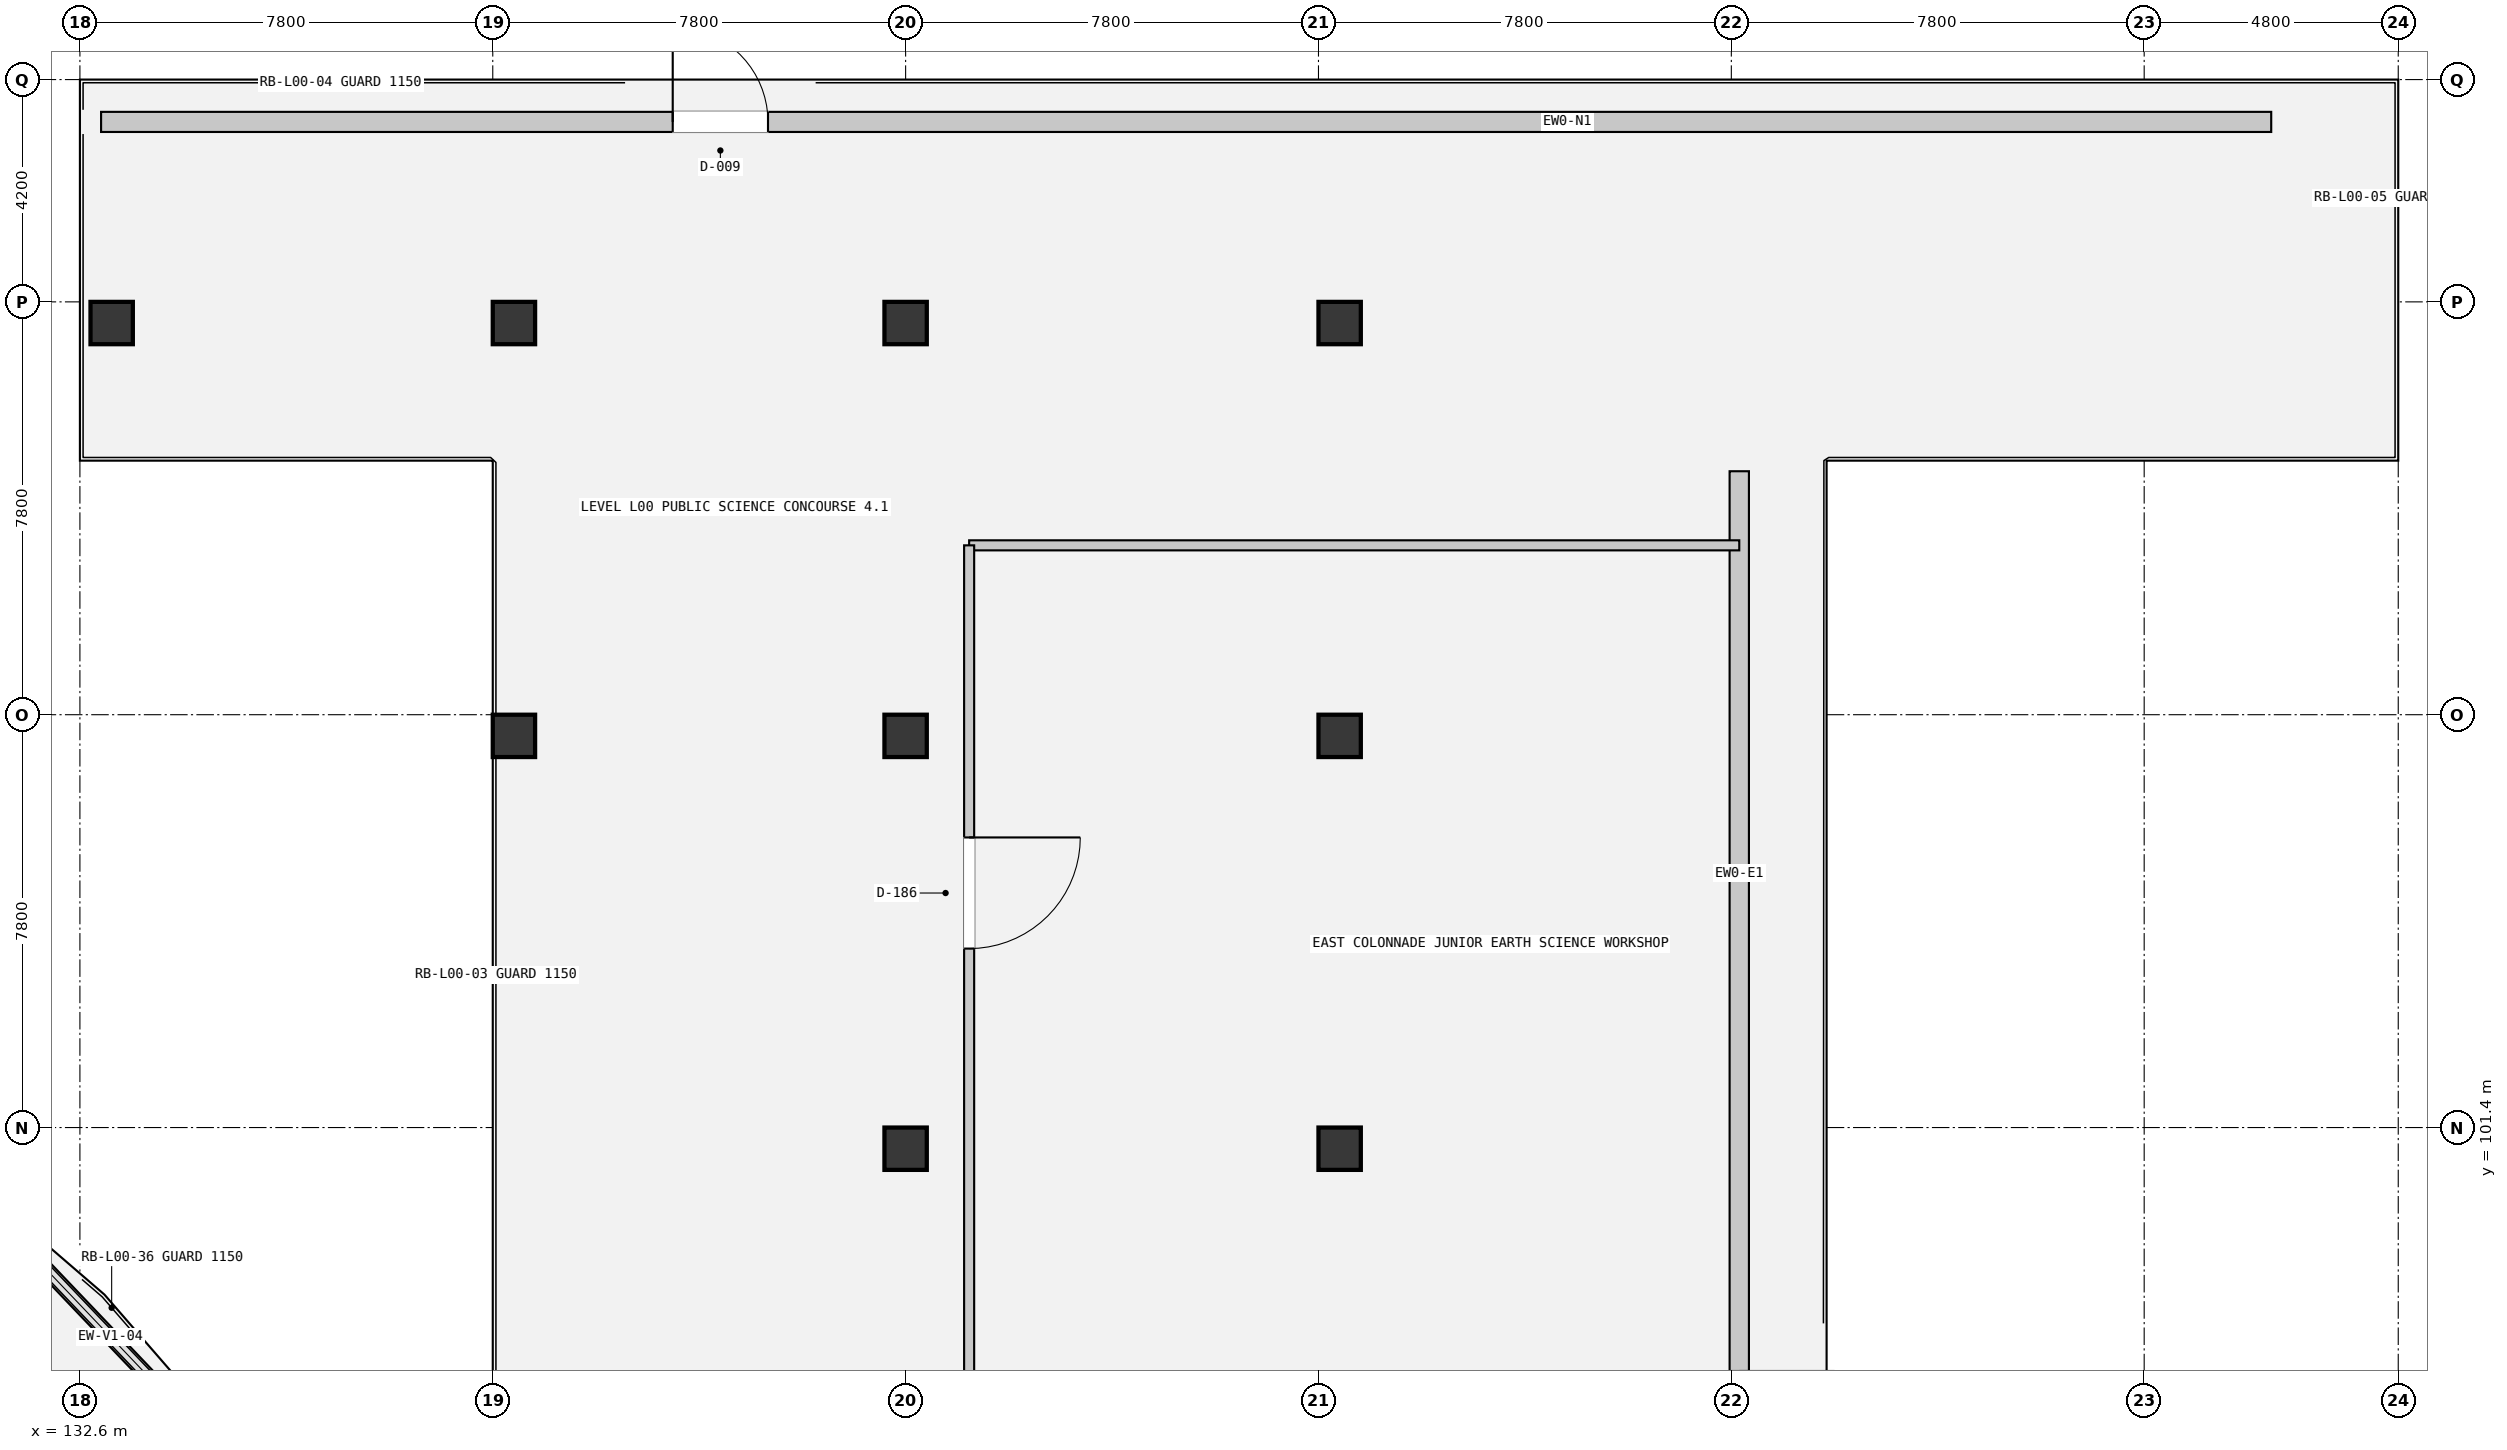
"""IFC4 building model, lengths in metres.
Left out: names, types, materials, properties, quantities, classifications, styles, units other than length and angle.
Written with IfcOpenShell. Run it as: python <this file> out.ifc"""

import sys

from ifc_helpers import new_model, si_unit, direction, frame, frame_2d, origin, origin_2d, place, context, subcontext, project, spatial, rectangle, extrude, element, fill, save


model = new_model("IFC4")
c1 = context("Model", 3, precision=1e-05, world=origin(), true_north=direction((0.0, 1.0)))
c2 = subcontext(c1, "Body", "Model", "MODEL_VIEW")
j1 = project(units=[si_unit("LENGTHUNIT", "METRE"), si_unit("PLANEANGLEUNIT", "RADIAN")], contexts=[c1])
p1 = place(None, origin())
s1 = spatial("IfcSite", under=j1, at=p1, CompositionType="ELEMENT")
p2 = place(p1, origin())
s2 = spatial("IfcBuilding", under=s1, at=p2, CompositionType="ELEMENT")
p3 = place(p2, origin())
s3 = spatial("IfcBuildingStorey", under=s2, at=p3, CompositionType="ELEMENT", Elevation=0.0)
for number, where, z_axis, x_axis in (
    (1, (133.2, 116.6, 0.0), (0.0, 0.0, 1.0), (1.0, 0.0, 0.0)),
    (2, (140.8, 108.8, 0.0), (0.0, 0.0, 1.0), (1.0, 0.0, 0.0)),
    (3, (140.8, 116.6, 0.0), (0.0, 0.0, 1.0), (1.0, 0.0, 0.0)),
    (4, (148.2, 101.0, 0.0), (0.0, 0.0, 1.0), (1.0, 0.0, 0.0)),
    (5, (148.2, 108.8, 0.0), (0.0, 0.0, 1.0), (1.0, 0.0, 0.0)),
    (6, (148.2, 116.6, 0.0), (0.0, 0.0, 1.0), (1.0, 0.0, 0.0)),
    (7, (156.4, 101.0, 0.0), (0.0, 0.0, 1.0), (1.0, 0.0, 0.0)),
    (8, (156.4, 108.8, 0.0), (0.0, 0.0, 1.0), (1.0, 0.0, 0.0)),
    (9, (156.4, 116.6, 0.0), (0.0, 0.0, 1.0), (1.0, 0.0, 0.0)),
):
    element("IfcColumn", number, at=place(p3, frame(where, z_axis=z_axis, x_axis=x_axis)), inside=s3, PredefinedType="COLUMN", context=c2, shape_type="SweptSolid", body=[
        extrude(rectangle(XDim=0.8, YDim=0.8, at=origin_2d()), origin(), (0.0, 0.0, 1.0), 5.4),
    ])
p4 = place(p3, frame((134.923, 95.617, 0.0), z_axis=(0.0, 0.0, 1.0), x_axis=(-0.689954149813, 0.723853072907, 0.0)))
e10 = element("IfcWall", 10, at=p4, inside=s3, PredefinedType="SOLIDWALL", context=c2, shape_type="SweptSolid", body=[
    extrude(rectangle(XDim=5.056, YDim=0.275, at=frame_2d((2.528, 0.0))), origin(), (0.0, 0.0, 1.0), 1.02),
])
p5 = place(p3, frame((133.0, 120.4, 0.0), z_axis=(0.0, 0.0, 1.0), x_axis=(1.0, 0.0, 0.0)))
e11 = element("IfcWall", 11, at=p5, inside=s3, PredefinedType="SOLIDWALL", context=c2, shape_type="SweptSolid", body=[
    extrude(rectangle(XDim=41.0, YDim=0.38, at=frame_2d((20.5, 0.0))), origin(), (0.0, 0.0, 1.0), 4.46),
])
p6 = place(p5, frame((10.8, 0.0, 0.0)))
e12 = element("IfcOpeningElement", 12, at=p6, cuts=e11, PredefinedType="OPENING", context=c2, shape_type="SweptSolid", body=[
    extrude(rectangle(XDim=1.8, YDim=2.4, at=frame_2d((0.9, 1.2))), frame((0.0, 0.2, 0.0), z_axis=(0.0, -1.0, 0.0), x_axis=(1.0, 0.0, 0.0)), (0.0, 0.0, 1.0), 0.4),
])
p7 = place(p3, frame((163.95, 113.8, 0.0), z_axis=(0.0, 0.0, 1.0), x_axis=(0.0, -1.0, 0.0)))
e13 = element("IfcWall", 13, at=p7, inside=s3, PredefinedType="SOLIDWALL", context=c2, shape_type="SweptSolid", body=[
    extrude(rectangle(XDim=32.0, YDim=0.365, at=frame_2d((16.0, 0.0))), origin(), (0.0, 0.0, 1.0), 4.46),
])
p8 = place(p7, frame((17.0, 0.0, 0.0)))
e14 = element("IfcOpeningElement", 14, at=p8, cuts=e13, PredefinedType="OPENING", context=c2, shape_type="SweptSolid", body=[
    extrude(rectangle(XDim=1.8, YDim=2.4, at=frame_2d((0.9, 1.2))), frame((0.0, 0.192, 0.0), z_axis=(0.0, -1.0, 0.0), x_axis=(1.0, 0.0, 0.0)), (0.0, 0.0, 1.0), 0.385),
])
p9 = place(p3, frame((163.95, 112.4, 0.0), z_axis=(0.0, 0.0, 1.0), x_axis=(-1.0, 0.0, 0.0)))
e15 = element("IfcWall", 15, at=p9, inside=s3, PredefinedType="PARTITIONING", context=c2, shape_type="SweptSolid", body=[
    extrude(rectangle(XDim=14.55, YDim=0.19, at=frame_2d((7.275, 0.0))), origin(), (0.0, 0.0, 1.0), 3.45),
])
p10 = place(p3, frame((149.4, 112.4, 0.0), z_axis=(0.0, 0.0, 1.0), x_axis=(0.0, -1.0, 0.0)))
e16 = element("IfcWall", 16, at=p10, inside=s3, PredefinedType="PARTITIONING", context=c2, shape_type="SweptSolid", body=[
    extrude(rectangle(XDim=29.2, YDim=0.19, at=frame_2d((14.6, 0.0))), origin(), (0.0, 0.0, 1.0), 3.45),
])
p11 = place(p10, frame((5.519, 0.0, 0.0)))
e17 = element("IfcOpeningElement", 17, at=p11, cuts=e16, PredefinedType="OPENING", context=c2, shape_type="SweptSolid", body=[
    extrude(rectangle(XDim=2.1, YDim=2.6, at=frame_2d((1.05, 1.3))), frame((0.0, 0.105, 0.0), z_axis=(0.0, -1.0, 0.0), x_axis=(1.0, 0.0, 0.0)), (0.0, 0.0, 1.0), 0.21),
])
p12 = place(p6, origin())
e18 = element("IfcDoor", 18, at=p12, inside=s3, OperationType="DOUBLE_DOOR_SINGLE_SWING", PredefinedType="DOOR", context=c2, shape_type="SweptSolid", body=[
    extrude(rectangle(XDim=1.8, YDim=2.4, at=frame_2d((0.9, 1.2))), frame((0.0, 0.025, 0.0), z_axis=(0.0, -1.0, 0.0), x_axis=(1.0, 0.0, 0.0)), (0.0, 0.0, 1.0), 0.05),
])
fill(e12, e18)
p13 = place(p11, origin())
e19 = element("IfcDoor", 19, at=p13, inside=s3, OperationType="DOUBLE_DOOR_SINGLE_SWING", PredefinedType="DOOR", context=c2, shape_type="SweptSolid", body=[
    extrude(rectangle(XDim=2.1, YDim=2.6, at=frame_2d((1.05, 1.3))), frame((0.0, 0.025, 0.0), z_axis=(0.0, -1.0, 0.0), x_axis=(1.0, 0.0, 0.0)), (0.0, 0.0, 1.0), 0.05),
])
fill(e17, e19)
save(model, sys.argv[1])
